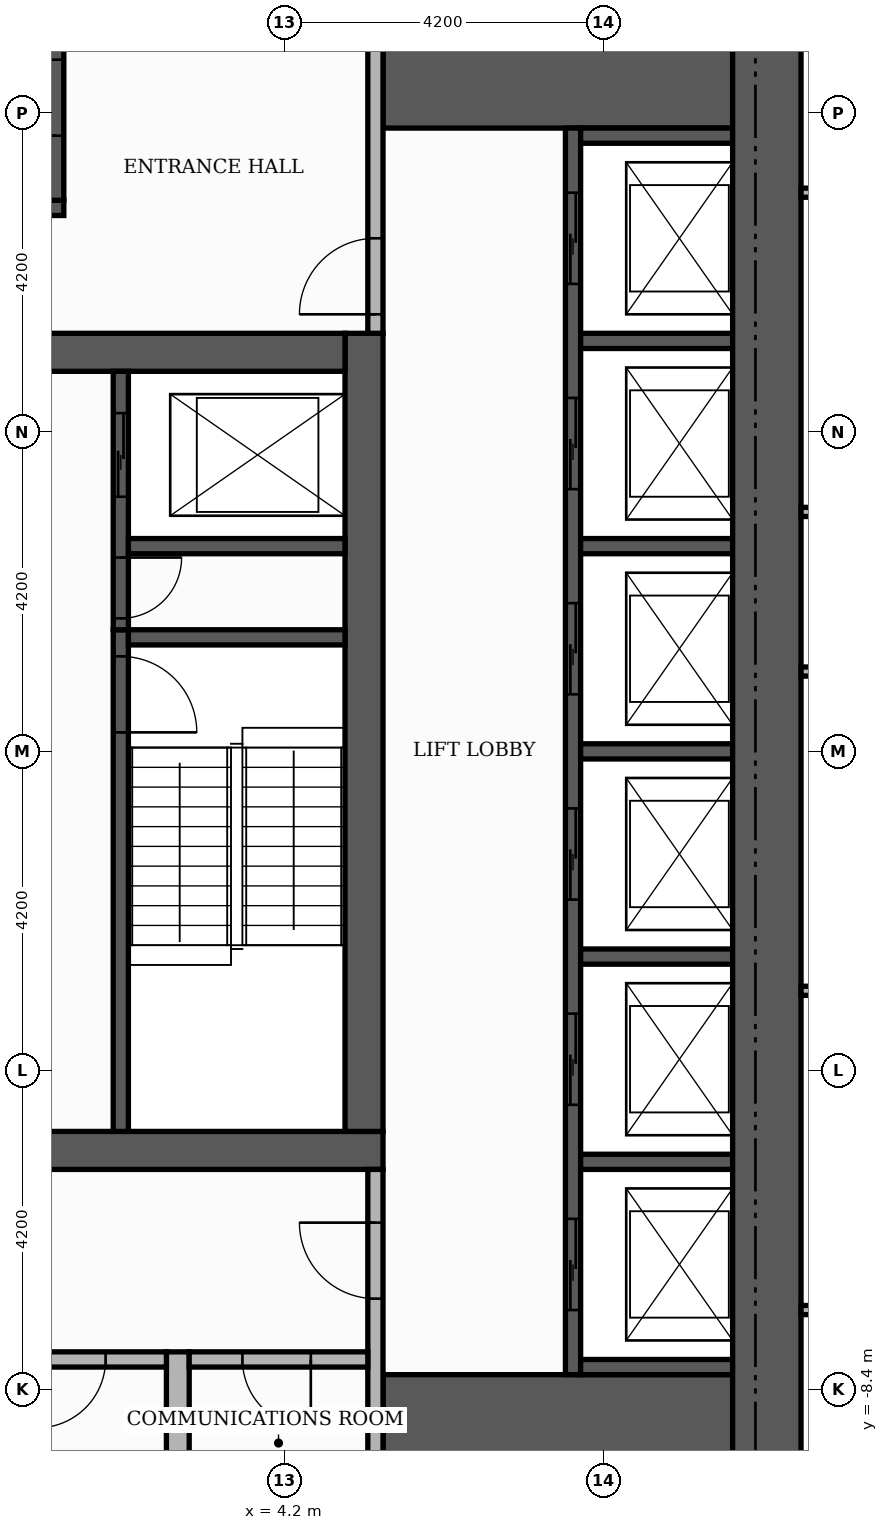
"""IFC4 building model, lengths in metres.
Left out: names, types, materials, properties, quantities, classifications, styles, units other than length and angle.
Written with IfcOpenShell. Run it as: python <this file> out.ifc"""

import sys

from ifc_helpers import new_model, si_unit, direction, frame, frame_2d, origin, place, context, subcontext, project, spatial, rectangle, extrude, element, fill, save


model = new_model("IFC4")
c1 = context("Model", 3, precision=1e-05, world=origin(), true_north=direction((0.0, 1.0)))
c2 = subcontext(c1, "Body", "Model", "MODEL_VIEW")
j1 = project(units=[si_unit("LENGTHUNIT", "METRE"), si_unit("PLANEANGLEUNIT", "RADIAN")], contexts=[c1])
p1 = place(None, origin())
s1 = spatial("IfcSite", under=j1, at=p1, CompositionType="ELEMENT")
p2 = place(p1, origin())
s2 = spatial("IfcBuilding", under=s1, at=p2, CompositionType="ELEMENT")
p3 = place(p2, frame((0.0, 0.0, 192.3)))
s3 = spatial("IfcBuildingStorey", under=s2, at=p3, CompositionType="ELEMENT", Elevation=192.3)
p4 = place(p3, frame((-5.5, -5.25, 0.0), z_axis=(0.0, 0.0, 1.0), x_axis=(1.0, 0.0, 0.0)))
e1 = element("IfcWall", 1, at=p4, inside=s3, PredefinedType="SHEAR", context=c2, shape_type="SweptSolid", body=[
    extrude(rectangle(XDim=11.0, YDim=0.5, at=frame_2d((5.5, 0.0))), origin(), (0.0, 0.0, 1.0), 3.48),
])
p5 = place(p4, frame((4.9, 0.0, 0.0)))
e2 = element("IfcOpeningElement", 2, at=p5, cuts=e1, PredefinedType="OPENING", context=c2, shape_type="SweptSolid", body=[
    extrude(rectangle(XDim=1.2, YDim=2.1, at=frame_2d((0.6, 1.05))), frame((0.0, 0.26, 0.0), z_axis=(0.0, -1.0, 0.0), x_axis=(1.0, 0.0, 0.0)), (0.0, 0.0, 1.0), 0.52),
])
p6 = place(p3, frame((5.25, -5.0, 0.0), z_axis=(0.0, 0.0, 1.0), x_axis=(0.0, 1.0, 0.0)))
e3 = element("IfcWall", 3, at=p6, inside=s3, PredefinedType="SHEAR", context=c2, shape_type="SweptSolid", body=[
    extrude(rectangle(XDim=10.5, YDim=0.5, at=frame_2d((5.25, 0.0))), origin(), (0.0, 0.0, 1.0), 3.48),
])
p7 = place(p3, frame((-5.0, 5.25, 0.0), z_axis=(0.0, 0.0, 1.0), x_axis=(1.0, 0.0, 0.0)))
e4 = element("IfcWall", 4, at=p7, inside=s3, PredefinedType="SHEAR", context=c2, shape_type="SweptSolid", body=[
    extrude(rectangle(XDim=10.0, YDim=0.5, at=frame_2d((5.0, 0.0))), origin(), (0.0, 0.0, 1.0), 3.48),
])
p8 = place(p7, frame((4.4, 0.0, 0.0)))
e5 = element("IfcOpeningElement", 5, at=p8, cuts=e4, PredefinedType="OPENING", context=c2, shape_type="SweptSolid", body=[
    extrude(rectangle(XDim=1.2, YDim=2.1, at=frame_2d((0.6, 1.05))), frame((0.0, 0.26, 0.0), z_axis=(0.0, -1.0, 0.0), x_axis=(1.0, 0.0, 0.0)), (0.0, 0.0, 1.0), 0.52),
])
for number, where, z_axis, x_axis in (
    (6, (5.5, -9.15, 0.0), (0.0, 0.0, 1.0), (1.0, 0.0, 0.0)),
    (7, (5.5, 9.15, 0.0), (0.0, 0.0, 1.0), (1.0, 0.0, 0.0)),
):
    element("IfcWall", number, at=place(p3, frame(where, z_axis=z_axis, x_axis=x_axis)), inside=s3, PredefinedType="SHEAR", context=c2, shape_type="SweptSolid", body=[
        extrude(rectangle(XDim=4.6, YDim=1.9, at=frame_2d((2.3, 0.0))), origin(), (0.0, 0.0, 1.0), 3.48),
    ])
p9 = place(p3, frame((2.05, -5.0, 0.0), z_axis=(0.0, 0.0, 1.0), x_axis=(0.0, 1.0, 0.0)))
e8 = element("IfcWall", 8, at=p9, inside=s3, PredefinedType="SHEAR", context=c2, shape_type="SweptSolid", body=[
    extrude(rectangle(XDim=6.6, YDim=0.2, at=frame_2d((3.3, 0.0))), origin(), (0.0, 0.0, 1.0), 3.48),
])
p10 = place(p9, frame((5.25, 0.0, 0.0)))
e9 = element("IfcOpeningElement", 9, at=p10, cuts=e8, PredefinedType="OPENING", context=c2, shape_type="SweptSolid", body=[
    extrude(rectangle(XDim=1.0, YDim=2.1, at=frame_2d((0.5, 1.05))), frame((0.0, 0.11, 0.0), z_axis=(0.0, -1.0, 0.0), x_axis=(1.0, 0.0, 0.0)), (0.0, 0.0, 1.0), 0.22),
])
p11 = place(p3, frame((2.15, 1.5, 0.0), z_axis=(0.0, 0.0, 1.0), x_axis=(1.0, 0.0, 0.0)))
e10 = element("IfcWall", 10, at=p11, inside=s3, PredefinedType="SHEAR", context=c2, shape_type="SweptSolid", body=[
    extrude(rectangle(XDim=2.85, YDim=0.2, at=frame_2d((1.425, 0.0))), origin(), (0.0, 0.0, 1.0), 3.48),
])
p12 = place(p3, frame((-5.5, 7.15, 0.0), z_axis=(0.0, 0.0, 1.0), x_axis=(1.0, 0.0, 0.0)))
e11 = element("IfcWall", 11, at=p12, inside=s3, PredefinedType="SHEAR", context=c2, shape_type="SweptSolid", body=[
    extrude(rectangle(XDim=6.8, YDim=0.2, at=frame_2d((3.4, 0.0))), origin(), (0.0, 0.0, 1.0), 3.48),
])
p13 = place(p3, frame((1.2, 7.25, 0.0), z_axis=(0.0, 0.0, 1.0), x_axis=(0.0, 1.0, 0.0)))
e12 = element("IfcWall", 12, at=p13, inside=s3, PredefinedType="SHEAR", context=c2, shape_type="SweptSolid", body=[
    extrude(rectangle(XDim=2.85, YDim=0.2, at=frame_2d((1.425, 0.0))), origin(), (0.0, 0.0, 1.0), 3.48),
])
p14 = place(p13, frame((0.85, 0.0, 0.0)))
e13 = element("IfcOpeningElement", 13, at=p14, cuts=e12, PredefinedType="OPENING", context=c2, shape_type="SweptSolid", body=[
    extrude(rectangle(XDim=1.0, YDim=2.1, at=frame_2d((0.5, 1.05))), frame((0.0, 0.11, 0.0), z_axis=(0.0, -1.0, 0.0), x_axis=(1.0, 0.0, 0.0)), (0.0, 0.0, 1.0), 0.22),
])
p15 = place(p3, frame((8.0, -8.2, 0.0), z_axis=(0.0, 0.0, 1.0), x_axis=(0.0, 1.0, 0.0)))
e14 = element("IfcWall", 14, at=p15, inside=s3, PredefinedType="SHEAR", context=c2, shape_type="SweptSolid", body=[
    extrude(rectangle(XDim=16.4, YDim=0.2, at=frame_2d((8.2, 0.0))), origin(), (0.0, 0.0, 1.0), 3.48),
])
p16 = place(p15, frame((0.85, 0.0, 0.0)))
e15 = element("IfcOpeningElement", 15, at=p16, cuts=e14, PredefinedType="OPENING", context=c2, shape_type="SweptSolid", body=[
    extrude(rectangle(XDim=1.2, YDim=2.1, at=frame_2d((0.6, 1.05))), frame((0.0, 0.11, 0.0), z_axis=(0.0, -1.0, 0.0), x_axis=(1.0, 0.0, 0.0)), (0.0, 0.0, 1.0), 0.22),
])
p17 = place(p15, frame((3.55, 0.0, 0.0)))
e16 = element("IfcOpeningElement", 16, at=p17, cuts=e14, PredefinedType="OPENING", context=c2, shape_type="SweptSolid", body=[
    extrude(rectangle(XDim=1.2, YDim=2.1, at=frame_2d((0.6, 1.05))), frame((0.0, 0.11, 0.0), z_axis=(0.0, -1.0, 0.0), x_axis=(1.0, 0.0, 0.0)), (0.0, 0.0, 1.0), 0.22),
])
p18 = place(p15, frame((6.25, 0.0, 0.0)))
e17 = element("IfcOpeningElement", 17, at=p18, cuts=e14, PredefinedType="OPENING", context=c2, shape_type="SweptSolid", body=[
    extrude(rectangle(XDim=1.2, YDim=2.1, at=frame_2d((0.6, 1.05))), frame((0.0, 0.11, 0.0), z_axis=(0.0, -1.0, 0.0), x_axis=(1.0, 0.0, 0.0)), (0.0, 0.0, 1.0), 0.22),
])
p19 = place(p15, frame((8.95, 0.0, 0.0)))
e18 = element("IfcOpeningElement", 18, at=p19, cuts=e14, PredefinedType="OPENING", context=c2, shape_type="SweptSolid", body=[
    extrude(rectangle(XDim=1.2, YDim=2.1, at=frame_2d((0.6, 1.05))), frame((0.0, 0.11, 0.0), z_axis=(0.0, -1.0, 0.0), x_axis=(1.0, 0.0, 0.0)), (0.0, 0.0, 1.0), 0.22),
])
p20 = place(p15, frame((11.65, 0.0, 0.0)))
e19 = element("IfcOpeningElement", 19, at=p20, cuts=e14, PredefinedType="OPENING", context=c2, shape_type="SweptSolid", body=[
    extrude(rectangle(XDim=1.2, YDim=2.1, at=frame_2d((0.6, 1.05))), frame((0.0, 0.11, 0.0), z_axis=(0.0, -1.0, 0.0), x_axis=(1.0, 0.0, 0.0)), (0.0, 0.0, 1.0), 0.22),
])
p21 = place(p15, frame((14.35, 0.0, 0.0)))
e20 = element("IfcOpeningElement", 20, at=p21, cuts=e14, PredefinedType="OPENING", context=c2, shape_type="SweptSolid", body=[
    extrude(rectangle(XDim=1.2, YDim=2.1, at=frame_2d((0.6, 1.05))), frame((0.0, 0.11, 0.0), z_axis=(0.0, -1.0, 0.0), x_axis=(1.0, 0.0, 0.0)), (0.0, 0.0, 1.0), 0.22),
])
for number, where, z_axis, x_axis in (
    (21, (8.1, -8.1, 0.0), (0.0, 0.0, 1.0), (1.0, 0.0, 0.0)),
    (22, (8.1, -5.4, 0.0), (0.0, 0.0, 1.0), (1.0, 0.0, 0.0)),
    (23, (8.1, -2.7, 0.0), (0.0, 0.0, 1.0), (1.0, 0.0, 0.0)),
    (24, (8.1, 0.0, 0.0), (0.0, 0.0, 1.0), (1.0, 0.0, 0.0)),
):
    element("IfcWall", number, at=place(p3, frame(where, z_axis=z_axis, x_axis=x_axis)), inside=s3, PredefinedType="SHEAR", context=c2, shape_type="SweptSolid", body=[
        extrude(rectangle(XDim=2.0, YDim=0.2, at=frame_2d((1.0, 0.0))), origin(), (0.0, 0.0, 1.0), 3.48),
    ])
p22 = place(p3, frame((2.05, 1.6, 0.0), z_axis=(0.0, 0.0, 1.0), x_axis=(0.0, 1.0, 0.0)))
e25 = element("IfcWall", 25, at=p22, inside=s3, PredefinedType="SHEAR", context=c2, shape_type="SweptSolid", body=[
    extrude(rectangle(XDim=3.4, YDim=0.2, at=frame_2d((1.7, 0.0))), origin(), (0.0, 0.0, 1.0), 3.48),
])
p23 = place(p22, frame((1.75, 0.0, 0.0)))
e26 = element("IfcOpeningElement", 26, at=p23, cuts=e25, PredefinedType="OPENING", context=c2, shape_type="SweptSolid", body=[
    extrude(rectangle(XDim=1.1, YDim=2.1, at=frame_2d((0.55, 1.05))), frame((0.0, 0.11, 0.0), z_axis=(0.0, -1.0, 0.0), x_axis=(1.0, 0.0, 0.0)), (0.0, 0.0, 1.0), 0.22),
])
p24 = place(p22, frame((0.15, 0.0, 0.0)))
e27 = element("IfcOpeningElement", 27, at=p24, cuts=e25, PredefinedType="OPENING", context=c2, shape_type="SweptSolid", body=[
    extrude(rectangle(XDim=0.8, YDim=2.1, at=frame_2d((0.4, 1.05))), frame((0.0, 0.11, 0.0), z_axis=(0.0, -1.0, 0.0), x_axis=(1.0, 0.0, 0.0)), (0.0, 0.0, 1.0), 0.22),
])
p25 = place(p3, frame((2.15, 2.7, 0.0), z_axis=(0.0, 0.0, 1.0), x_axis=(1.0, 0.0, 0.0)))
e28 = element("IfcWall", 28, at=p25, inside=s3, PredefinedType="SHEAR", context=c2, shape_type="SweptSolid", body=[
    extrude(rectangle(XDim=2.85, YDim=0.2, at=frame_2d((1.425, 0.0))), origin(), (0.0, 0.0, 1.0), 3.48),
])
for number, where, z_axis, x_axis in (
    (29, (8.1, 2.7, 0.0), (0.0, 0.0, 1.0), (1.0, 0.0, 0.0)),
    (30, (8.1, 5.4, 0.0), (0.0, 0.0, 1.0), (1.0, 0.0, 0.0)),
    (31, (8.1, 8.1, 0.0), (0.0, 0.0, 1.0), (1.0, 0.0, 0.0)),
):
    element("IfcWall", number, at=place(p3, frame(where, z_axis=z_axis, x_axis=x_axis)), inside=s3, PredefinedType="SHEAR", context=c2, shape_type="SweptSolid", body=[
        extrude(rectangle(XDim=2.0, YDim=0.2, at=frame_2d((1.0, 0.0))), origin(), (0.0, 0.0, 1.0), 3.48),
    ])
p26 = place(p3, frame((10.55, -10.1, 0.0), z_axis=(0.0, 0.0, 1.0), x_axis=(0.0, 1.0, 0.0)))
e32 = element("IfcWall", 32, at=p26, inside=s3, PredefinedType="SHEAR", context=c2, shape_type="SweptSolid", body=[
    extrude(rectangle(XDim=20.2, YDim=0.9, at=frame_2d((10.1, 0.0))), origin(), (0.0, 0.0, 1.0), 3.48),
])
p27 = place(p3, frame((2.8, -10.1, 0.0), z_axis=(0.0, 0.0, 1.0), x_axis=(0.0, 1.0, 0.0)))
e33 = element("IfcWall", 33, at=p27, inside=s3, PredefinedType="PARTITIONING", context=c2, shape_type="SweptSolid", body=[
    extrude(rectangle(XDim=2.2, YDim=0.3, at=frame_2d((1.1, 0.0))), origin(), (0.0, 0.0, 1.0), 3.48),
])
p28 = place(p3, frame((5.4, -10.1, 0.0), z_axis=(0.0, 0.0, 1.0), x_axis=(0.0, 1.0, 0.0)))
e34 = element("IfcWall", 34, at=p28, inside=s3, PredefinedType="PARTITIONING", context=c2, shape_type="SweptSolid", body=[
    extrude(rectangle(XDim=4.6, YDim=0.2, at=frame_2d((2.3, 0.0))), origin(), (0.0, 0.0, 1.0), 3.48),
])
p29 = place(p28, frame((2.9, 0.0, 0.0)))
e35 = element("IfcOpeningElement", 35, at=p29, cuts=e34, PredefinedType="OPENING", context=c2, shape_type="SweptSolid", body=[
    extrude(rectangle(XDim=1.0, YDim=2.1, at=frame_2d((0.5, 1.05))), frame((0.0, 0.11, 0.0), z_axis=(0.0, -1.0, 0.0), x_axis=(1.0, 0.0, 0.0)), (0.0, 0.0, 1.0), 0.22),
])
p30 = place(p3, frame((0.1, -8.0, 0.0), z_axis=(0.0, 0.0, 1.0), x_axis=(1.0, 0.0, 0.0)))
e36 = element("IfcWall", 36, at=p30, inside=s3, PredefinedType="PARTITIONING", context=c2, shape_type="SweptSolid", body=[
    extrude(rectangle(XDim=2.55, YDim=0.2, at=frame_2d((1.275, 0.0))), origin(), (0.0, 0.0, 1.0), 3.48),
])
p31 = place(p30, frame((0.85, 0.0, 0.0)))
e37 = element("IfcOpeningElement", 37, at=p31, cuts=e36, PredefinedType="OPENING", context=c2, shape_type="SweptSolid", body=[
    extrude(rectangle(XDim=0.9, YDim=2.1, at=frame_2d((0.45, 1.05))), frame((0.0, 0.11, 0.0), z_axis=(0.0, -1.0, 0.0), x_axis=(1.0, 0.0, 0.0)), (0.0, 0.0, 1.0), 0.22),
])
p32 = place(p3, frame((2.95, -8.0, 0.0), z_axis=(0.0, 0.0, 1.0), x_axis=(1.0, 0.0, 0.0)))
e38 = element("IfcWall", 38, at=p32, inside=s3, PredefinedType="PARTITIONING", context=c2, shape_type="SweptSolid", body=[
    extrude(rectangle(XDim=2.35, YDim=0.2, at=frame_2d((1.175, 0.0))), origin(), (0.0, 0.0, 1.0), 3.48),
])
p33 = place(p32, frame((0.7, 0.0, 0.0)))
e39 = element("IfcOpeningElement", 39, at=p33, cuts=e38, PredefinedType="OPENING", context=c2, shape_type="SweptSolid", body=[
    extrude(rectangle(XDim=0.9, YDim=2.1, at=frame_2d((0.45, 1.05))), frame((0.0, 0.11, 0.0), z_axis=(0.0, -1.0, 0.0), x_axis=(1.0, 0.0, 0.0)), (0.0, 0.0, 1.0), 0.22),
])
p34 = place(p3, frame((5.4, 5.5, 0.0), z_axis=(0.0, 0.0, 1.0), x_axis=(0.0, 1.0, 0.0)))
e40 = element("IfcWall", 40, at=p34, inside=s3, PredefinedType="PARTITIONING", context=c2, shape_type="SweptSolid", body=[
    extrude(rectangle(XDim=4.6, YDim=0.2, at=frame_2d((2.3, 0.0))), origin(), (0.0, 0.0, 1.0), 3.48),
])
p35 = place(p34, frame((0.25, 0.0, 0.0)))
e41 = element("IfcOpeningElement", 41, at=p35, cuts=e40, PredefinedType="OPENING", context=c2, shape_type="SweptSolid", body=[
    extrude(rectangle(XDim=1.0, YDim=2.1, at=frame_2d((0.5, 1.05))), frame((0.0, 0.11, 0.0), z_axis=(0.0, -1.0, 0.0), x_axis=(1.0, 0.0, 0.0)), (0.0, 0.0, 1.0), 0.22),
])
p36 = place(p3, frame((11.0, -7.35, 0.0), z_axis=(0.0, 0.0, 1.0), x_axis=(1.0, 0.0, 0.0)))
e42 = element("IfcWall", 42, at=p36, inside=s3, PredefinedType="PARTITIONING", context=c2, shape_type="SweptSolid", body=[
    extrude(rectangle(XDim=7.62, YDim=0.12, at=frame_2d((3.81, 0.0))), origin(), (0.0, 0.0, 1.0), 3.48),
])
p37 = place(p36, frame((3.36, 0.0, 0.0)))
e43 = element("IfcOpeningElement", 43, at=p37, cuts=e42, PredefinedType="OPENING", context=c2, shape_type="SweptSolid", body=[
    extrude(rectangle(XDim=0.9, YDim=2.1, at=frame_2d((0.45, 1.05))), frame((0.0, 0.07, 0.0), z_axis=(0.0, -1.0, 0.0), x_axis=(1.0, 0.0, 0.0)), (0.0, 0.0, 1.0), 0.14),
])
for number, where, z_axis, x_axis in (
    (44, (11.0, -3.15, 0.0), (0.0, 0.0, 1.0), (1.0, 0.0, 0.0)),
    (45, (11.0, 1.05, 0.0), (0.0, 0.0, 1.0), (1.0, 0.0, 0.0)),
    (46, (11.0, 3.15, 0.0), (0.0, 0.0, 1.0), (1.0, 0.0, 0.0)),
    (47, (11.0, 7.35, 0.0), (0.0, 0.0, 1.0), (1.0, 0.0, 0.0)),
):
    element("IfcWall", number, at=place(p3, frame(where, z_axis=z_axis, x_axis=x_axis)), inside=s3, PredefinedType="PARTITIONING", context=c2, shape_type="SweptSolid", body=[
        extrude(rectangle(XDim=7.62, YDim=0.12, at=frame_2d((3.81, 0.0))), origin(), (0.0, 0.0, 1.0), 3.48),
    ])
p38 = place(p16, origin())
e48 = element("IfcDoor", 48, at=p38, inside=s3, OperationType="SLIDING_TO_LEFT", PredefinedType="DOOR", context=c2, shape_type="SweptSolid", body=[
    extrude(rectangle(XDim=1.2, YDim=2.1, at=frame_2d((0.6, 1.05))), frame((0.0, 0.025, 0.0), z_axis=(0.0, -1.0, 0.0), x_axis=(1.0, 0.0, 0.0)), (0.0, 0.0, 1.0), 0.05),
])
fill(e15, e48)
p39 = place(p17, origin())
e49 = element("IfcDoor", 49, at=p39, inside=s3, OperationType="SLIDING_TO_LEFT", PredefinedType="DOOR", context=c2, shape_type="SweptSolid", body=[
    extrude(rectangle(XDim=1.2, YDim=2.1, at=frame_2d((0.6, 1.05))), frame((0.0, 0.025, 0.0), z_axis=(0.0, -1.0, 0.0), x_axis=(1.0, 0.0, 0.0)), (0.0, 0.0, 1.0), 0.05),
])
fill(e16, e49)
p40 = place(p18, origin())
e50 = element("IfcDoor", 50, at=p40, inside=s3, OperationType="SLIDING_TO_LEFT", PredefinedType="DOOR", context=c2, shape_type="SweptSolid", body=[
    extrude(rectangle(XDim=1.2, YDim=2.1, at=frame_2d((0.6, 1.05))), frame((0.0, 0.025, 0.0), z_axis=(0.0, -1.0, 0.0), x_axis=(1.0, 0.0, 0.0)), (0.0, 0.0, 1.0), 0.05),
])
fill(e17, e50)
p41 = place(p19, origin())
e51 = element("IfcDoor", 51, at=p41, inside=s3, OperationType="SLIDING_TO_LEFT", PredefinedType="DOOR", context=c2, shape_type="SweptSolid", body=[
    extrude(rectangle(XDim=1.2, YDim=2.1, at=frame_2d((0.6, 1.05))), frame((0.0, 0.025, 0.0), z_axis=(0.0, -1.0, 0.0), x_axis=(1.0, 0.0, 0.0)), (0.0, 0.0, 1.0), 0.05),
])
fill(e18, e51)
p42 = place(p20, origin())
e52 = element("IfcDoor", 52, at=p42, inside=s3, OperationType="SLIDING_TO_LEFT", PredefinedType="DOOR", context=c2, shape_type="SweptSolid", body=[
    extrude(rectangle(XDim=1.2, YDim=2.1, at=frame_2d((0.6, 1.05))), frame((0.0, 0.025, 0.0), z_axis=(0.0, -1.0, 0.0), x_axis=(1.0, 0.0, 0.0)), (0.0, 0.0, 1.0), 0.05),
])
fill(e19, e52)
p43 = place(p21, origin())
e53 = element("IfcDoor", 53, at=p43, inside=s3, OperationType="SLIDING_TO_LEFT", PredefinedType="DOOR", context=c2, shape_type="SweptSolid", body=[
    extrude(rectangle(XDim=1.2, YDim=2.1, at=frame_2d((0.6, 1.05))), frame((0.0, 0.025, 0.0), z_axis=(0.0, -1.0, 0.0), x_axis=(1.0, 0.0, 0.0)), (0.0, 0.0, 1.0), 0.05),
])
fill(e20, e53)
p44 = place(p23, origin())
e54 = element("IfcDoor", 54, at=p44, inside=s3, OperationType="SLIDING_TO_LEFT", PredefinedType="DOOR", context=c2, shape_type="SweptSolid", body=[
    extrude(rectangle(XDim=1.1, YDim=2.1, at=frame_2d((0.55, 1.05))), frame((0.0, 0.025, 0.0), z_axis=(0.0, -1.0, 0.0), x_axis=(1.0, 0.0, 0.0)), (0.0, 0.0, 1.0), 0.05),
])
fill(e26, e54)
p45 = place(p10, frame((1.0, 0.0, 0.0), z_axis=(0.0, 0.0, 1.0), x_axis=(-1.0, 0.0, 0.0)))
e55 = element("IfcDoor", 55, at=p45, inside=s3, OperationType="SINGLE_SWING_LEFT", PredefinedType="DOOR", context=c2, shape_type="SweptSolid", body=[
    extrude(rectangle(XDim=1.0, YDim=2.1, at=frame_2d((0.5, 1.05))), frame((0.0, 0.025, 0.0), z_axis=(0.0, -1.0, 0.0), x_axis=(1.0, 0.0, 0.0)), (0.0, 0.0, 1.0), 0.05),
])
fill(e9, e55)
p46 = place(p24, frame((0.8, 0.0, 0.0), z_axis=(0.0, 0.0, 1.0), x_axis=(-1.0, 0.0, 0.0)))
e56 = element("IfcDoor", 56, at=p46, inside=s3, OperationType="SINGLE_SWING_RIGHT", PredefinedType="DOOR", context=c2, shape_type="SweptSolid", body=[
    extrude(rectangle(XDim=0.8, YDim=2.1, at=frame_2d((0.4, 1.05))), frame((0.0, 0.025, 0.0), z_axis=(0.0, -1.0, 0.0), x_axis=(1.0, 0.0, 0.0)), (0.0, 0.0, 1.0), 0.05),
])
fill(e27, e56)
p47 = place(p14, origin())
e57 = element("IfcDoor", 57, at=p47, inside=s3, OperationType="SINGLE_SWING_LEFT", PredefinedType="DOOR", context=c2, shape_type="SweptSolid", body=[
    extrude(rectangle(XDim=1.0, YDim=2.1, at=frame_2d((0.5, 1.05))), frame((0.0, 0.025, 0.0), z_axis=(0.0, -1.0, 0.0), x_axis=(1.0, 0.0, 0.0)), (0.0, 0.0, 1.0), 0.05),
])
fill(e13, e57)
p48 = place(p35, origin())
e58 = element("IfcDoor", 58, at=p48, inside=s3, OperationType="SINGLE_SWING_LEFT", PredefinedType="DOOR", context=c2, shape_type="SweptSolid", body=[
    extrude(rectangle(XDim=1.0, YDim=2.1, at=frame_2d((0.5, 1.05))), frame((0.0, 0.025, 0.0), z_axis=(0.0, -1.0, 0.0), x_axis=(1.0, 0.0, 0.0)), (0.0, 0.0, 1.0), 0.05),
])
fill(e41, e58)
p49 = place(p29, origin())
e59 = element("IfcDoor", 59, at=p49, inside=s3, OperationType="SINGLE_SWING_RIGHT", PredefinedType="DOOR", context=c2, shape_type="SweptSolid", body=[
    extrude(rectangle(XDim=1.0, YDim=2.1, at=frame_2d((0.5, 1.05))), frame((0.0, 0.025, 0.0), z_axis=(0.0, -1.0, 0.0), x_axis=(1.0, 0.0, 0.0)), (0.0, 0.0, 1.0), 0.05),
])
fill(e35, e59)
p50 = place(p31, frame((0.9, 0.0, 0.0), z_axis=(0.0, 0.0, 1.0), x_axis=(-1.0, 0.0, 0.0)))
e60 = element("IfcDoor", 60, at=p50, inside=s3, OperationType="SINGLE_SWING_LEFT", PredefinedType="DOOR", context=c2, shape_type="SweptSolid", body=[
    extrude(rectangle(XDim=0.9, YDim=2.1, at=frame_2d((0.45, 1.05))), frame((0.0, 0.025, 0.0), z_axis=(0.0, -1.0, 0.0), x_axis=(1.0, 0.0, 0.0)), (0.0, 0.0, 1.0), 0.05),
])
fill(e37, e60)
p51 = place(p33, frame((0.9, 0.0, 0.0), z_axis=(0.0, 0.0, 1.0), x_axis=(-1.0, 0.0, 0.0)))
e61 = element("IfcDoor", 61, at=p51, inside=s3, OperationType="SINGLE_SWING_RIGHT", PredefinedType="DOOR", context=c2, shape_type="SweptSolid", body=[
    extrude(rectangle(XDim=0.9, YDim=2.1, at=frame_2d((0.45, 1.05))), frame((0.0, 0.025, 0.0), z_axis=(0.0, -1.0, 0.0), x_axis=(1.0, 0.0, 0.0)), (0.0, 0.0, 1.0), 0.05),
])
fill(e39, e61)
save(model, sys.argv[1])
